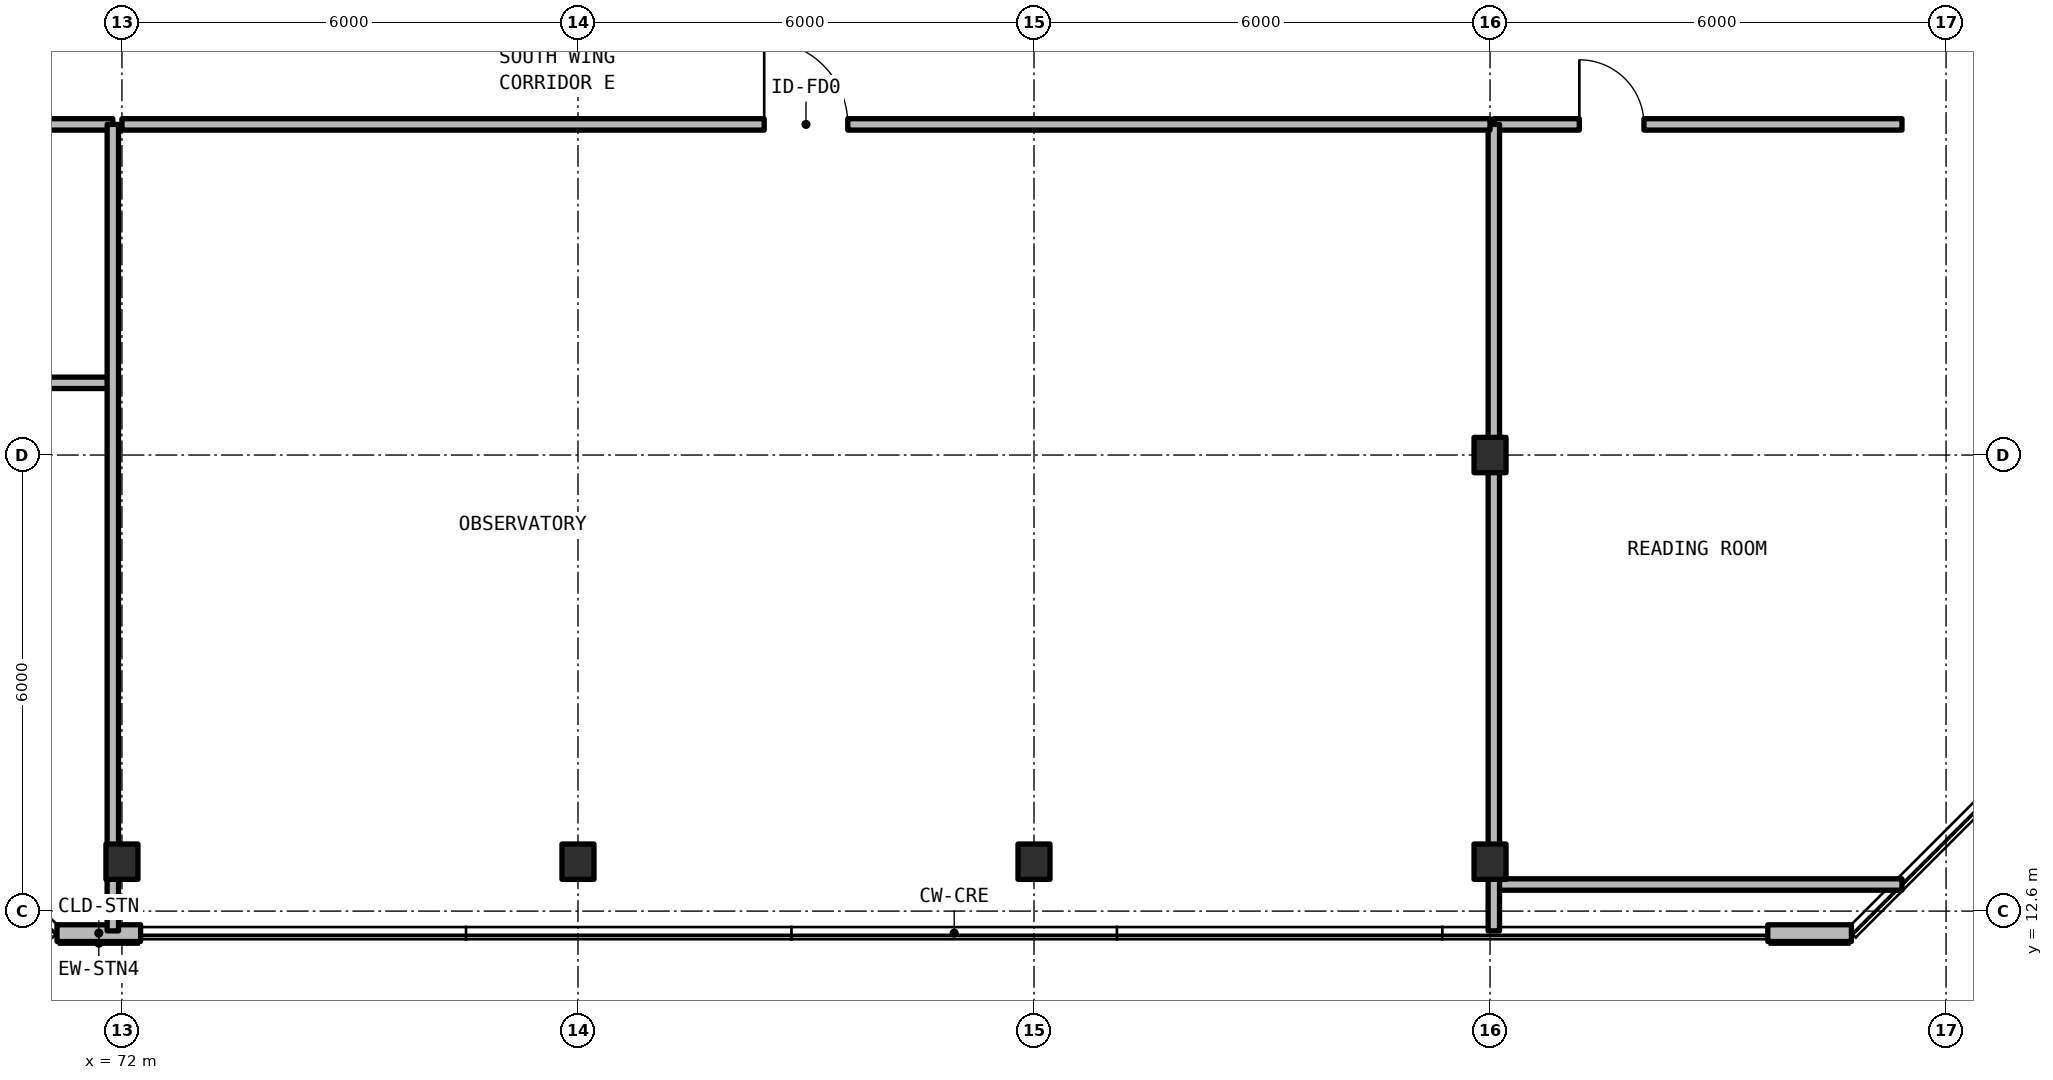
"""IFC4 building model, lengths in metres.
Left out: names, types, materials, properties, quantities, classifications, styles, units other than length and angle.
Written with IfcOpenShell. Run it as: python <this file> out.ifc"""

import sys

from ifc_helpers import new_model, si_unit, direction, frame, frame_2d, origin, origin_2d, place, context, subcontext, project, spatial, rectangle, i_section, extrude, element, fill, save


model = new_model("IFC4")
c1 = context("Model", 3, precision=1e-05, world=origin(), true_north=direction((0.0, 1.0)))
c2 = subcontext(c1, "Body", "Model", "MODEL_VIEW")
j1 = project(units=[si_unit("LENGTHUNIT", "METRE"), si_unit("PLANEANGLEUNIT", "RADIAN")], contexts=[c1])
p1 = place(None, origin())
s1 = spatial("IfcSite", under=j1, at=p1, CompositionType="ELEMENT")
p2 = place(p1, origin())
s2 = spatial("IfcBuilding", under=s1, at=p2, CompositionType="ELEMENT")
p3 = place(p2, frame((0.0, 0.0, 264.33)))
s3 = spatial("IfcBuildingStorey", under=s2, at=p3, CompositionType="ELEMENT", Elevation=264.33)
for number, where, z_axis, x_axis in (
    (1, (90.0, 18.6, 0.0), (0.0, 0.0, 1.0), (1.0, 0.0, 0.0)),
    (2, (72.0, 13.25, 0.0), (0.0, 0.0, 1.0), (1.0, 0.0, 0.0)),
    (3, (78.0, 13.25, 0.0), (0.0, 0.0, 1.0), (1.0, 0.0, 0.0)),
    (4, (84.0, 13.25, 0.0), (0.0, 0.0, 1.0), (1.0, 0.0, 0.0)),
    (5, (90.0, 13.25, 0.0), (0.0, 0.0, 1.0), (1.0, 0.0, 0.0)),
):
    element("IfcColumn", number, at=place(p3, frame(where, z_axis=z_axis, x_axis=x_axis)), inside=s3, PredefinedType="COLUMN", context=c2, shape_type="SweptSolid", body=[
        extrude(i_section(OverallWidth=0.421, OverallDepth=0.465, WebThickness=0.045, FlangeThickness=0.07, FilletRadius=0.015, at=origin_2d()), origin(), (0.0, 0.0, 1.0), 3.63),
    ])
for number, where, z_axis, x_axis in (
    (6, (71.146, 12.31, 0.0), (0.0, 0.0, 1.0), (1.0, 0.0, 0.0)),
    (7, (93.654, 12.31, 0.0), (0.0, 0.0, 1.0), (1.0, 0.0, 0.0)),
):
    element("IfcWall", number, at=place(p3, frame(where, z_axis=z_axis, x_axis=x_axis)), inside=s3, PredefinedType="SOLIDWALL", context=c2, shape_type="SweptSolid", body=[
        extrude(rectangle(XDim=1.1, YDim=0.22, at=frame_2d((0.55, 0.0))), origin(), (0.0, 0.0, 1.0), 3.41),
    ])
p4 = place(p3, frame((64.8, 19.55, 0.0), z_axis=(0.0, 0.0, 1.0), x_axis=(1.0, 0.0, 0.0)))
e8 = element("IfcWall", 8, at=p4, inside=s3, PredefinedType="SOLIDWALL", context=c2, shape_type="SweptSolid", body=[
    extrude(rectangle(XDim=7.08, YDim=0.15, at=frame_2d((3.54, 0.0))), origin(), (0.0, 0.0, 1.0), 2.63),
])
p5 = place(p3, frame((64.8, 22.95, 0.0), z_axis=(0.0, 0.0, 1.0), x_axis=(1.0, 0.0, 0.0)))
e9 = element("IfcWall", 9, at=p5, inside=s3, PredefinedType="SOLIDWALL", context=c2, shape_type="SweptSolid", body=[
    extrude(rectangle(XDim=7.08, YDim=0.15, at=frame_2d((3.54, 0.0))), origin(), (0.0, 0.0, 1.0), 2.63),
])
p6 = place(p5, frame((3.225, 0.0, 0.0)))
e10 = element("IfcOpeningElement", 10, at=p6, cuts=e9, PredefinedType="OPENING", context=c2, shape_type="SweptSolid", body=[
    extrude(rectangle(XDim=0.85, YDim=2.1, at=frame_2d((0.425, 1.05))), frame((0.0, 0.085, 0.0), z_axis=(0.0, -1.0, 0.0), x_axis=(1.0, 0.0, 0.0)), (0.0, 0.0, 1.0), 0.17),
])
p7 = place(p3, frame((71.88, 12.34, 0.0), z_axis=(0.0, 0.0, 1.0), x_axis=(0.0, 1.0, 0.0)))
e11 = element("IfcWall", 11, at=p7, inside=s3, PredefinedType="SOLIDWALL", context=c2, shape_type="SweptSolid", body=[
    extrude(rectangle(XDim=10.61, YDim=0.15, at=frame_2d((5.305, 0.0))), origin(), (0.0, 0.0, 1.0), 2.63),
])
p8 = place(p3, frame((90.05, 12.95, 0.0), z_axis=(0.0, 0.0, 1.0), x_axis=(1.0, 0.0, 0.0)))
e12 = element("IfcWall", 12, at=p8, inside=s3, PredefinedType="SOLIDWALL", context=c2, shape_type="SweptSolid", body=[
    extrude(rectangle(XDim=5.37, YDim=0.15, at=frame_2d((2.685, 0.0))), origin(), (0.0, 0.0, 1.0), 2.63),
])
p9 = place(p3, frame((90.05, 22.95, 0.0), z_axis=(0.0, 0.0, 1.0), x_axis=(1.0, 0.0, 0.0)))
e13 = element("IfcWall", 13, at=p9, inside=s3, PredefinedType="SOLIDWALL", context=c2, shape_type="SweptSolid", body=[
    extrude(rectangle(XDim=5.37, YDim=0.15, at=frame_2d((2.685, 0.0))), origin(), (0.0, 0.0, 1.0), 2.63),
])
p10 = place(p9, frame((1.125, 0.0, 0.0)))
e14 = element("IfcOpeningElement", 14, at=p10, cuts=e13, PredefinedType="OPENING", context=c2, shape_type="SweptSolid", body=[
    extrude(rectangle(XDim=0.85, YDim=2.1, at=frame_2d((0.425, 1.05))), frame((0.0, 0.085, 0.0), z_axis=(0.0, -1.0, 0.0), x_axis=(1.0, 0.0, 0.0)), (0.0, 0.0, 1.0), 0.17),
])
p11 = place(p3, frame((90.05, 12.34, 0.0), z_axis=(0.0, 0.0, 1.0), x_axis=(0.0, 1.0, 0.0)))
e15 = element("IfcWall", 15, at=p11, inside=s3, PredefinedType="SOLIDWALL", context=c2, shape_type="SweptSolid", body=[
    extrude(rectangle(XDim=10.61, YDim=0.15, at=frame_2d((5.305, 0.0))), origin(), (0.0, 0.0, 1.0), 2.63),
])
p12 = place(p3, frame((72.0, 22.95, 0.0), z_axis=(0.0, 0.0, 1.0), x_axis=(1.0, 0.0, 0.0)))
e16 = element("IfcWall", 16, at=p12, inside=s3, PredefinedType="SOLIDWALL", context=c2, shape_type="SweptSolid", body=[
    extrude(rectangle(XDim=18.0, YDim=0.15, at=frame_2d((9.0, 0.0))), origin(), (0.0, 0.0, 1.0), 2.63),
])
p13 = place(p12, frame((8.45, 0.0, 0.0)))
e17 = element("IfcOpeningElement", 17, at=p13, cuts=e16, PredefinedType="OPENING", context=c2, shape_type="SweptSolid", body=[
    extrude(rectangle(XDim=1.1, YDim=2.15, at=frame_2d((0.55, 1.075))), frame((0.0, 0.085, 0.0), z_axis=(0.0, -1.0, 0.0), x_axis=(1.0, 0.0, 0.0)), (0.0, 0.0, 1.0), 0.17),
])
p14 = place(p10, origin())
e18 = element("IfcDoor", 18, at=p14, inside=s3, OperationType="SINGLE_SWING_LEFT", PredefinedType="DOOR", context=c2, shape_type="SweptSolid", body=[
    extrude(rectangle(XDim=0.85, YDim=2.1, at=frame_2d((0.425, 1.05))), frame((0.0, 0.025, 0.0), z_axis=(0.0, -1.0, 0.0), x_axis=(1.0, 0.0, 0.0)), (0.0, 0.0, 1.0), 0.05),
])
fill(e14, e18)
p15 = place(p13, origin())
e19 = element("IfcDoor", 19, at=p15, inside=s3, OperationType="SINGLE_SWING_LEFT", PredefinedType="DOOR", context=c2, shape_type="SweptSolid", body=[
    extrude(rectangle(XDim=1.1, YDim=2.15, at=frame_2d((0.55, 1.075))), frame((0.0, 0.025, 0.0), z_axis=(0.0, -1.0, 0.0), x_axis=(1.0, 0.0, 0.0)), (0.0, 0.0, 1.0), 0.05),
])
fill(e17, e19)
save(model, sys.argv[1])
